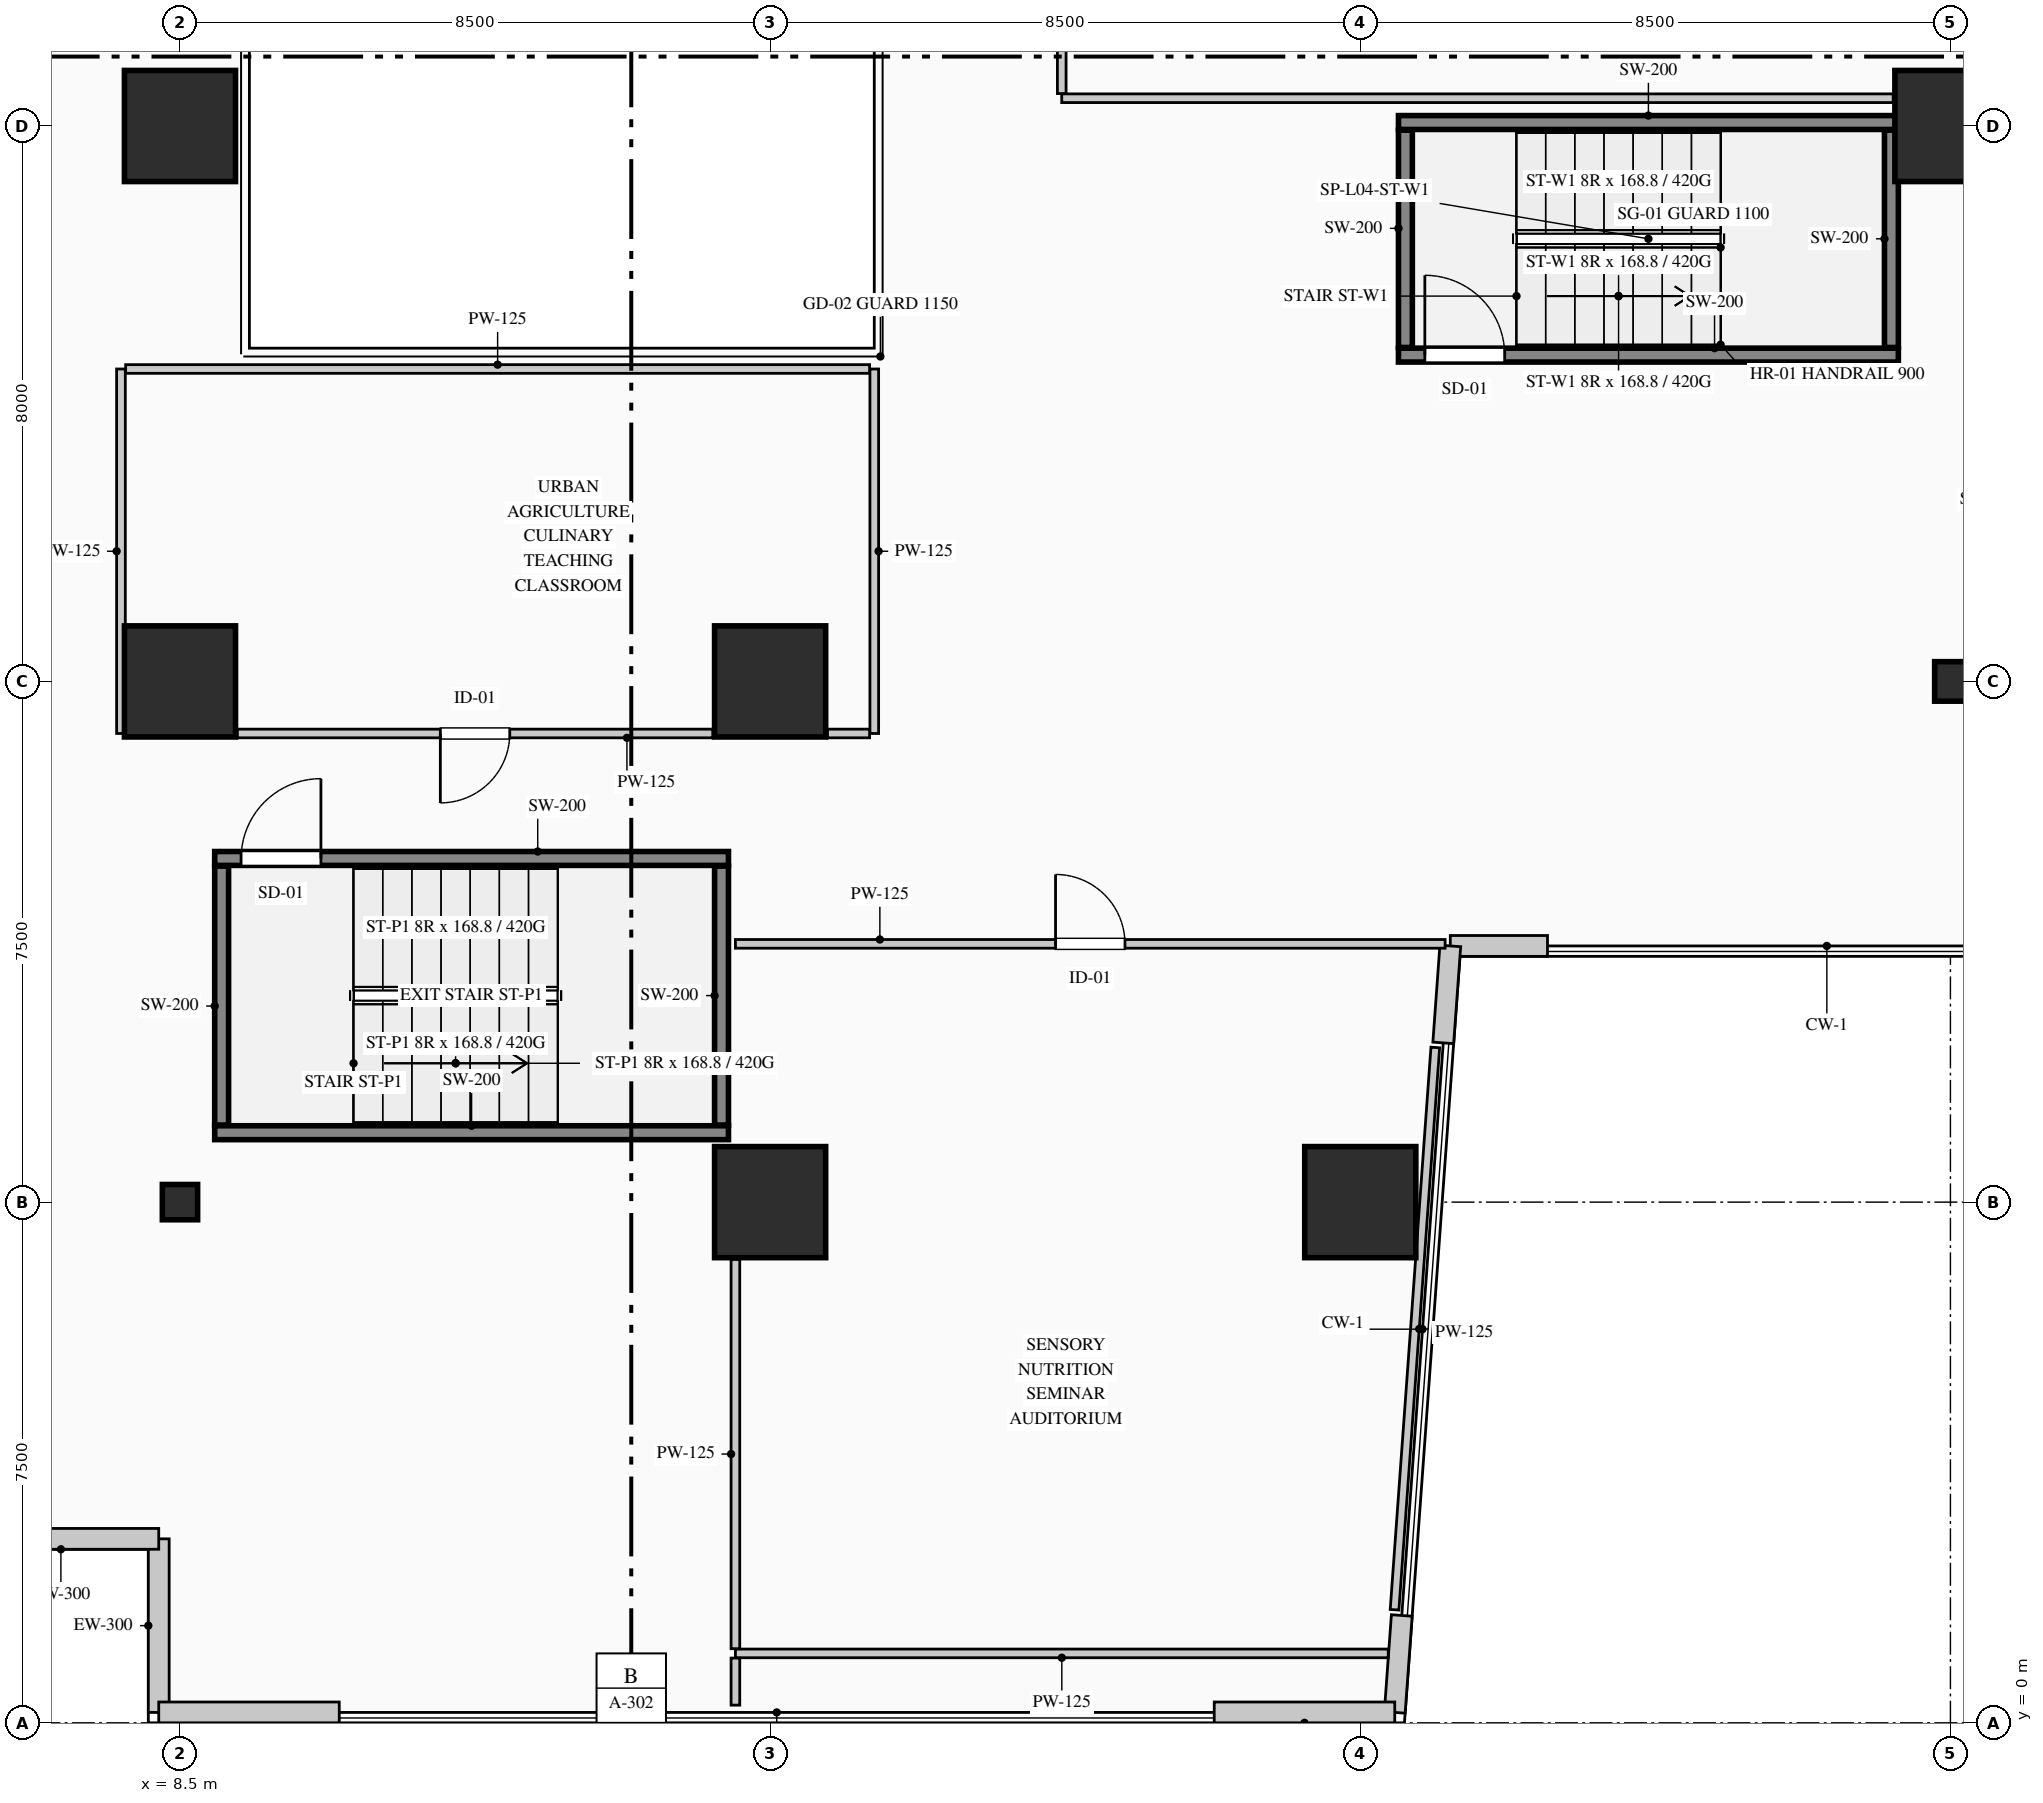
"""IFC4 building model, lengths in metres.
Left out: names, types, materials, properties, quantities, classifications, styles, units other than length and angle.
Written with IfcOpenShell. Run it as: python <this file> out.ifc"""

import sys

from ifc_helpers import new_model, si_unit, direction, frame, frame_2d, origin, origin_2d, place, context, subcontext, project, spatial, rectangle, hollow_circle, i_section, extrude, element, fill, save


model = new_model("IFC4")
c1 = context("Model", 3, precision=1e-05, world=origin(), true_north=direction((0.0, 1.0)))
c2 = subcontext(c1, "Body", "Model", "MODEL_VIEW")
j1 = project(units=[si_unit("LENGTHUNIT", "METRE"), si_unit("PLANEANGLEUNIT", "RADIAN")], contexts=[c1])
p1 = place(None, origin())
s1 = spatial("IfcSite", under=j1, at=p1, CompositionType="ELEMENT")
p2 = place(p1, origin())
s2 = spatial("IfcBuilding", under=s1, at=p2, CompositionType="ELEMENT")
p3 = place(p2, frame((0.0, 0.0, 16.2)))
s3 = spatial("IfcBuildingStorey", under=s2, at=p3, CompositionType="ELEMENT", Elevation=16.2)
p4 = place(p3, frame((26.05, 19.7, 0.0), z_axis=(0.0, 0.0, 1.0), x_axis=(1.0, 0.0, 0.0)))
e1 = element("IfcWall", 1, at=p4, inside=s3, PredefinedType="SHEAR", context=c2, shape_type="SweptSolid", body=[
    extrude(rectangle(XDim=7.2, YDim=0.2, at=frame_2d((3.6, 0.0))), origin(), (0.0, 0.0, 1.0), 5.4),
])
p5 = place(p4, frame((0.38, 0.0, 0.0)))
e2 = element("IfcOpeningElement", 2, at=p5, cuts=e1, PredefinedType="OPENING", context=c2, shape_type="SweptSolid", body=[
    extrude(rectangle(XDim=1.15, YDim=2.2, at=frame_2d((0.575, 1.1))), frame((0.0, 0.11, 0.0), z_axis=(0.0, -1.0, 0.0), x_axis=(1.0, 0.0, 0.0)), (0.0, 0.0, 1.0), 0.22),
])
p6 = place(p3, frame((26.05, 23.05, 0.0), z_axis=(0.0, 0.0, 1.0), x_axis=(1.0, 0.0, 0.0)))
e3 = element("IfcWall", 3, at=p6, inside=s3, PredefinedType="SHEAR", context=c2, shape_type="SweptSolid", body=[
    extrude(rectangle(XDim=7.2, YDim=0.2, at=frame_2d((3.6, 0.0))), origin(), (0.0, 0.0, 1.0), 5.4),
])
for number, where, z_axis, x_axis in (
    (4, (26.15, 19.81, 0.0), (0.0, 0.0, 1.0), (0.0, 1.0, 0.0)),
    (5, (33.15, 19.81, 0.0), (0.0, 0.0, 1.0), (0.0, 1.0, 0.0)),
):
    element("IfcWall", number, at=place(p3, frame(where, z_axis=z_axis, x_axis=x_axis)), inside=s3, PredefinedType="SHEAR", context=c2, shape_type="SweptSolid", body=[
        extrude(rectangle(XDim=3.13, YDim=0.2, at=frame_2d((1.565, 0.0))), origin(), (0.0, 0.0, 1.0), 5.4),
    ])
p7 = place(p3, frame((9.0, 8.5, 0.0), z_axis=(0.0, 0.0, 1.0), x_axis=(1.0, 0.0, 0.0)))
e6 = element("IfcWall", 6, at=p7, inside=s3, PredefinedType="SHEAR", context=c2, shape_type="SweptSolid", body=[
    extrude(rectangle(XDim=7.4, YDim=0.2, at=frame_2d((3.7, 0.0))), origin(), (0.0, 0.0, 1.0), 5.4),
])
p8 = place(p3, frame((9.0, 12.45, 0.0), z_axis=(0.0, 0.0, 1.0), x_axis=(1.0, 0.0, 0.0)))
e7 = element("IfcWall", 7, at=p8, inside=s3, PredefinedType="SHEAR", context=c2, shape_type="SweptSolid", body=[
    extrude(rectangle(XDim=7.4, YDim=0.2, at=frame_2d((3.7, 0.0))), origin(), (0.0, 0.0, 1.0), 5.4),
])
p9 = place(p8, frame((0.38, 0.0, 0.0)))
e8 = element("IfcOpeningElement", 8, at=p9, cuts=e7, PredefinedType="OPENING", context=c2, shape_type="SweptSolid", body=[
    extrude(rectangle(XDim=1.15, YDim=2.2, at=frame_2d((0.575, 1.1))), frame((0.0, 0.11, 0.0), z_axis=(0.0, -1.0, 0.0), x_axis=(1.0, 0.0, 0.0)), (0.0, 0.0, 1.0), 0.22),
])
for number, where, z_axis, x_axis in (
    (9, (9.1, 8.61, 0.0), (0.0, 0.0, 1.0), (0.0, 1.0, 0.0)),
    (10, (16.3, 8.61, 0.0), (0.0, 0.0, 1.0), (0.0, 1.0, 0.0)),
):
    element("IfcWall", number, at=place(p3, frame(where, z_axis=z_axis, x_axis=x_axis)), inside=s3, PredefinedType="SHEAR", context=c2, shape_type="SweptSolid", body=[
        extrude(rectangle(XDim=3.73, YDim=0.2, at=frame_2d((1.865, 0.0))), origin(), (0.0, 0.0, 1.0), 5.4),
    ])
p10 = place(p3, frame((8.5, 7.5, 0.0), z_axis=(0.0, 0.0, 1.0), x_axis=(1.0, 0.0, 0.0)))
e11 = element("IfcColumn", 11, at=p10, inside=s3, PredefinedType="COLUMN", context=c2, shape_type="SweptSolid", body=[
    extrude(hollow_circle(Radius=0.254, WallThickness=0.025, at=origin_2d()), origin(), (0.0, 0.0, 1.0), 5.4),
])
for number, where, z_axis, x_axis in (
    (12, (8.5, 15.0, 0.0), (0.0, 0.0, 1.0), (1.0, 0.0, 0.0)),
    (13, (8.5, 23.0, 0.0), (0.0, 0.0, 1.0), (1.0, 0.0, 0.0)),
    (14, (17.0, 7.5, 0.0), (0.0, 0.0, 1.0), (1.0, 0.0, 0.0)),
    (15, (17.0, 15.0, 0.0), (0.0, 0.0, 1.0), (1.0, 0.0, 0.0)),
    (16, (25.5, 7.5, 0.0), (0.0, 0.0, 1.0), (1.0, 0.0, 0.0)),
):
    element("IfcColumn", number, at=place(p3, frame(where, z_axis=z_axis, x_axis=x_axis)), inside=s3, PredefinedType="COLUMN", context=c2, shape_type="SweptSolid", body=[
        extrude(rectangle(XDim=1.6, YDim=1.6, at=origin_2d()), origin(), (0.0, 0.0, 1.0), 5.4),
    ])
p11 = place(p3, frame((34.0, 15.0, 0.0), z_axis=(0.0, 0.0, 1.0), x_axis=(1.0, 0.0, 0.0)))
e17 = element("IfcColumn", 17, at=p11, inside=s3, PredefinedType="COLUMN", context=c2, shape_type="SweptSolid", body=[
    extrude(i_section(OverallWidth=0.454, OverallDepth=0.569, WebThickness=0.078, FlangeThickness=0.08, FilletRadius=0.015, at=origin_2d()), origin(), (0.0, 0.0, 1.0), 5.4),
])
p12 = place(p3, frame((34.0, 23.0, 0.0), z_axis=(0.0, 0.0, 1.0), x_axis=(1.0, 0.0, 0.0)))
e18 = element("IfcColumn", 18, at=p12, inside=s3, PredefinedType="COLUMN", context=c2, shape_type="SweptSolid", body=[
    extrude(rectangle(XDim=1.6, YDim=1.6, at=origin_2d()), origin(), (0.0, 0.0, 1.0), 5.4),
])
p13 = place(p3, frame((8.194, 0.15, 0.0), z_axis=(0.0, 0.0, 1.0), x_axis=(0.0, 1.0, 0.0)))
e19 = element("IfcWall", 19, at=p13, inside=s3, PredefinedType="STANDARD", context=c2, shape_type="SweptSolid", body=[
    extrude(rectangle(XDim=2.5, YDim=0.3, at=frame_2d((1.25, 0.0))), origin(), (0.0, 0.0, 1.0), 5.0),
])
p14 = place(p3, frame((8.194, 2.65, 0.0), z_axis=(0.0, 0.0, 1.0), x_axis=(-1.0, 0.0, 0.0)))
e20 = element("IfcWall", 20, at=p14, inside=s3, PredefinedType="STANDARD", context=c2, shape_type="SweptSolid", body=[
    extrude(rectangle(XDim=2.818, YDim=0.3, at=frame_2d((1.409, 0.0))), origin(), (0.0, 0.0, 1.0), 5.0),
])
p15 = place(p3, frame((28.197, 11.19, 0.0), z_axis=(0.0, 0.0, 1.0), x_axis=(-1.0, 0.0, 0.0)))
e21 = element("IfcWall", 21, at=p15, inside=s3, PredefinedType="STANDARD", context=c2, shape_type="SweptSolid", body=[
    extrude(rectangle(XDim=1.4, YDim=0.3, at=frame_2d((0.7, 0.0))), origin(), (0.0, 0.0, 1.0), 5.0),
])
p16 = place(p3, frame((26.796, 11.19, 0.0), z_axis=(0.0, 0.0, 1.0), x_axis=(-0.072201344972, -0.997390077043, 0.0)))
e22 = element("IfcWall", 22, at=p16, inside=s3, PredefinedType="STANDARD", context=c2, shape_type="SweptSolid", body=[
    extrude(rectangle(XDim=1.4, YDim=0.3, at=frame_2d((0.7, 0.0))), origin(), (0.0, 0.0, 1.0), 5.0),
])
p17 = place(p3, frame((26.098, 1.546, 0.0), z_axis=(0.0, 0.0, 1.0), x_axis=(-0.072188788144, -0.997390985956, 0.0)))
e23 = element("IfcWall", 23, at=p17, inside=s3, PredefinedType="STANDARD", context=c2, shape_type="SweptSolid", body=[
    extrude(rectangle(XDim=1.4, YDim=0.3, at=frame_2d((0.7, 0.0))), origin(), (0.0, 0.0, 1.0), 5.0),
])
p18 = place(p3, frame((25.997, 0.15, 0.0), z_axis=(0.0, 0.0, 1.0), x_axis=(-1.0, 0.0, 0.0)))
e24 = element("IfcWall", 24, at=p18, inside=s3, PredefinedType="STANDARD", context=c2, shape_type="SweptSolid", body=[
    extrude(rectangle(XDim=2.6, YDim=0.3, at=frame_2d((1.3, 0.0))), origin(), (0.0, 0.0, 1.0), 5.0),
])
p19 = place(p3, frame((10.794, 0.15, 0.0), z_axis=(0.0, 0.0, 1.0), x_axis=(-1.0, 0.0, 0.0)))
e25 = element("IfcWall", 25, at=p19, inside=s3, PredefinedType="STANDARD", context=c2, shape_type="SweptSolid", body=[
    extrude(rectangle(XDim=2.6, YDim=0.3, at=frame_2d((1.3, 0.0))), origin(), (0.0, 0.0, 1.0), 5.0),
])
p20 = place(p3, frame((18.5, 19.5, 0.0), z_axis=(0.0, 0.0, 1.0), x_axis=(0.0, -1.0, 0.0)))
e26 = element("IfcWall", 26, at=p20, inside=s3, PredefinedType="PARTITIONING", context=c2, shape_type="SweptSolid", body=[
    extrude(rectangle(XDim=5.25, YDim=0.125, at=frame_2d((2.625, 0.0))), origin(), (0.0, 0.0, 1.0), 4.485),
])
p21 = place(p3, frame((18.433, 14.25, 0.0), z_axis=(0.0, 0.0, 1.0), x_axis=(-1.0, 0.0, 0.0)))
e27 = element("IfcWall", 27, at=p21, inside=s3, PredefinedType="PARTITIONING", context=c2, shape_type="SweptSolid", body=[
    extrude(rectangle(XDim=0.608, YDim=0.125, at=frame_2d((0.304, 0.0))), origin(), (0.0, 0.0, 1.0), 5.0),
])
p22 = place(p3, frame((16.175, 14.25, 0.0), z_axis=(0.0, 0.0, 1.0), x_axis=(-1.0, 0.0, 0.0)))
e28 = element("IfcWall", 28, at=p22, inside=s3, PredefinedType="PARTITIONING", context=c2, shape_type="SweptSolid", body=[
    extrude(rectangle(XDim=6.85, YDim=0.125, at=frame_2d((3.425, 0.0))), origin(), (0.0, 0.0, 1.0), 5.0),
])
p23 = place(p22, frame((2.925, 0.0, 0.0)))
e29 = element("IfcOpeningElement", 29, at=p23, cuts=e28, PredefinedType="OPENING", context=c2, shape_type="SweptSolid", body=[
    extrude(rectangle(XDim=1.0, YDim=2.15, at=frame_2d((0.5, 1.075))), frame((0.0, 0.073, 0.0), z_axis=(0.0, -1.0, 0.0), x_axis=(1.0, 0.0, 0.0)), (0.0, 0.0, 1.0), 0.145),
])
p24 = place(p3, frame((7.65, 14.25, 0.0), z_axis=(0.0, 0.0, 1.0), x_axis=(0.0, 1.0, 0.0)))
e30 = element("IfcWall", 30, at=p24, inside=s3, PredefinedType="PARTITIONING", context=c2, shape_type="SweptSolid", body=[
    extrude(rectangle(XDim=5.25, YDim=0.125, at=frame_2d((2.625, 0.0))), origin(), (0.0, 0.0, 1.0), 5.0),
])
p25 = place(p3, frame((7.718, 19.5, 0.0), z_axis=(0.0, 0.0, 1.0), x_axis=(1.0, 0.0, 0.0)))
e31 = element("IfcWall", 31, at=p25, inside=s3, PredefinedType="PARTITIONING", context=c2, shape_type="SweptSolid", body=[
    extrude(rectangle(XDim=10.715, YDim=0.125, at=frame_2d((5.357, 0.0))), origin(), (0.0, 0.0, 1.0), 5.0),
])
p26 = place(p3, frame((26.581, 9.727, 0.0), z_axis=(0.0, 0.0, 1.0), x_axis=(-0.072281196228, -0.997384293375, 0.0)))
e32 = element("IfcWall", 32, at=p26, inside=s3, PredefinedType="PARTITIONING", context=c2, shape_type="SweptSolid", body=[
    extrude(rectangle(XDim=8.12, YDim=0.125, at=frame_2d((4.06, 0.0))), origin(), (0.0, 0.0, 1.0), 5.0),
])
p27 = place(p3, frame((25.903, 1.0, 0.0), z_axis=(0.0, 0.0, 1.0), x_axis=(-1.0, 0.0, 0.0)))
e33 = element("IfcWall", 33, at=p27, inside=s3, PredefinedType="PARTITIONING", context=c2, shape_type="SweptSolid", body=[
    extrude(rectangle(XDim=9.403, YDim=0.125, at=frame_2d((4.701, 0.0))), origin(), (0.0, 0.0, 1.0), 5.0),
])
p28 = place(p3, frame((16.5, 0.255, 0.0), z_axis=(0.0, 0.0, 1.0), x_axis=(0.0, 1.0, 0.0)))
e34 = element("IfcWall", 34, at=p28, inside=s3, PredefinedType="PARTITIONING", context=c2, shape_type="SweptSolid", body=[
    extrude(rectangle(XDim=0.678, YDim=0.125, at=frame_2d((0.339, 0.0))), origin(), (0.0, 0.0, 1.0), 5.0),
])
p29 = place(p3, frame((16.5, 1.067, 0.0), z_axis=(0.0, 0.0, 1.0), x_axis=(0.0, 1.0, 0.0)))
e35 = element("IfcWall", 35, at=p29, inside=s3, PredefinedType="PARTITIONING", context=c2, shape_type="SweptSolid", body=[
    extrude(rectangle(XDim=5.608, YDim=0.125, at=frame_2d((2.804, 0.0))), origin(), (0.0, 0.0, 1.0), 5.0),
])
p30 = place(p3, frame((16.5, 11.22, 0.0), z_axis=(0.0, 0.0, 1.0), x_axis=(1.0, 0.0, 0.0)))
e36 = element("IfcWall", 36, at=p30, inside=s3, PredefinedType="PARTITIONING", context=c2, shape_type="SweptSolid", body=[
    extrude(rectangle(XDim=10.222, YDim=0.125, at=frame_2d((5.111, 0.0))), origin(), (0.0, 0.0, 1.0), 5.0),
])
p31 = place(p30, frame((4.611, 0.0, 0.0)))
e37 = element("IfcOpeningElement", 37, at=p31, cuts=e36, PredefinedType="OPENING", context=c2, shape_type="SweptSolid", body=[
    extrude(rectangle(XDim=1.0, YDim=2.15, at=frame_2d((0.5, 1.075))), frame((0.0, 0.073, 0.0), z_axis=(0.0, -1.0, 0.0), x_axis=(1.0, 0.0, 0.0)), (0.0, 0.0, 1.0), 0.145),
])
p32 = place(p3, frame((33.175, 23.4, 0.0), z_axis=(0.0, 0.0, 1.0), x_axis=(-1.0, 0.0, 0.0)))
e38 = element("IfcWall", 38, at=p32, inside=s3, PredefinedType="PARTITIONING", context=c2, shape_type="SweptSolid", body=[
    extrude(rectangle(XDim=11.975, YDim=0.125, at=frame_2d((5.988, 0.0))), origin(), (0.0, 0.0, 1.0), 5.0),
])
p33 = place(p3, frame((21.2, 23.468, 0.0), z_axis=(0.0, 0.0, 1.0), x_axis=(0.0, 1.0, 0.0)))
e39 = element("IfcWall", 39, at=p33, inside=s3, PredefinedType="PARTITIONING", context=c2, shape_type="SweptSolid", body=[
    extrude(rectangle(XDim=5.032, YDim=0.125, at=frame_2d((2.516, 0.0))), origin(), (0.0, 0.0, 1.0), 5.0),
])
p34 = place(p5, origin())
e40 = element("IfcDoor", 40, at=p34, inside=s3, OperationType="SINGLE_SWING_LEFT", PredefinedType="DOOR", context=c2, shape_type="SweptSolid", body=[
    extrude(rectangle(XDim=1.15, YDim=2.2, at=frame_2d((0.575, 1.1))), frame((0.0, 0.025, 0.0), z_axis=(0.0, -1.0, 0.0), x_axis=(1.0, 0.0, 0.0)), (0.0, 0.0, 1.0), 0.05),
])
fill(e2, e40)
p35 = place(p9, origin())
e41 = element("IfcDoor", 41, at=p35, inside=s3, OperationType="SINGLE_SWING_RIGHT", PredefinedType="DOOR", context=c2, shape_type="SweptSolid", body=[
    extrude(rectangle(XDim=1.15, YDim=2.2, at=frame_2d((0.575, 1.1))), frame((0.0, 0.025, 0.0), z_axis=(0.0, -1.0, 0.0), x_axis=(1.0, 0.0, 0.0)), (0.0, 0.0, 1.0), 0.05),
])
fill(e8, e41)
p36 = place(p23, origin())
e42 = element("IfcDoor", 42, at=p36, inside=s3, OperationType="SINGLE_SWING_RIGHT", PredefinedType="DOOR", context=c2, shape_type="SweptSolid", body=[
    extrude(rectangle(XDim=1.0, YDim=2.15, at=frame_2d((0.5, 1.075))), frame((0.0, 0.025, 0.0), z_axis=(0.0, -1.0, 0.0), x_axis=(1.0, 0.0, 0.0)), (0.0, 0.0, 1.0), 0.05),
])
fill(e29, e42)
p37 = place(p31, origin())
e43 = element("IfcDoor", 43, at=p37, inside=s3, OperationType="SINGLE_SWING_LEFT", PredefinedType="DOOR", context=c2, shape_type="SweptSolid", body=[
    extrude(rectangle(XDim=1.0, YDim=2.15, at=frame_2d((0.5, 1.075))), frame((0.0, 0.025, 0.0), z_axis=(0.0, -1.0, 0.0), x_axis=(1.0, 0.0, 0.0)), (0.0, 0.0, 1.0), 0.05),
])
fill(e37, e43)
save(model, sys.argv[1])
